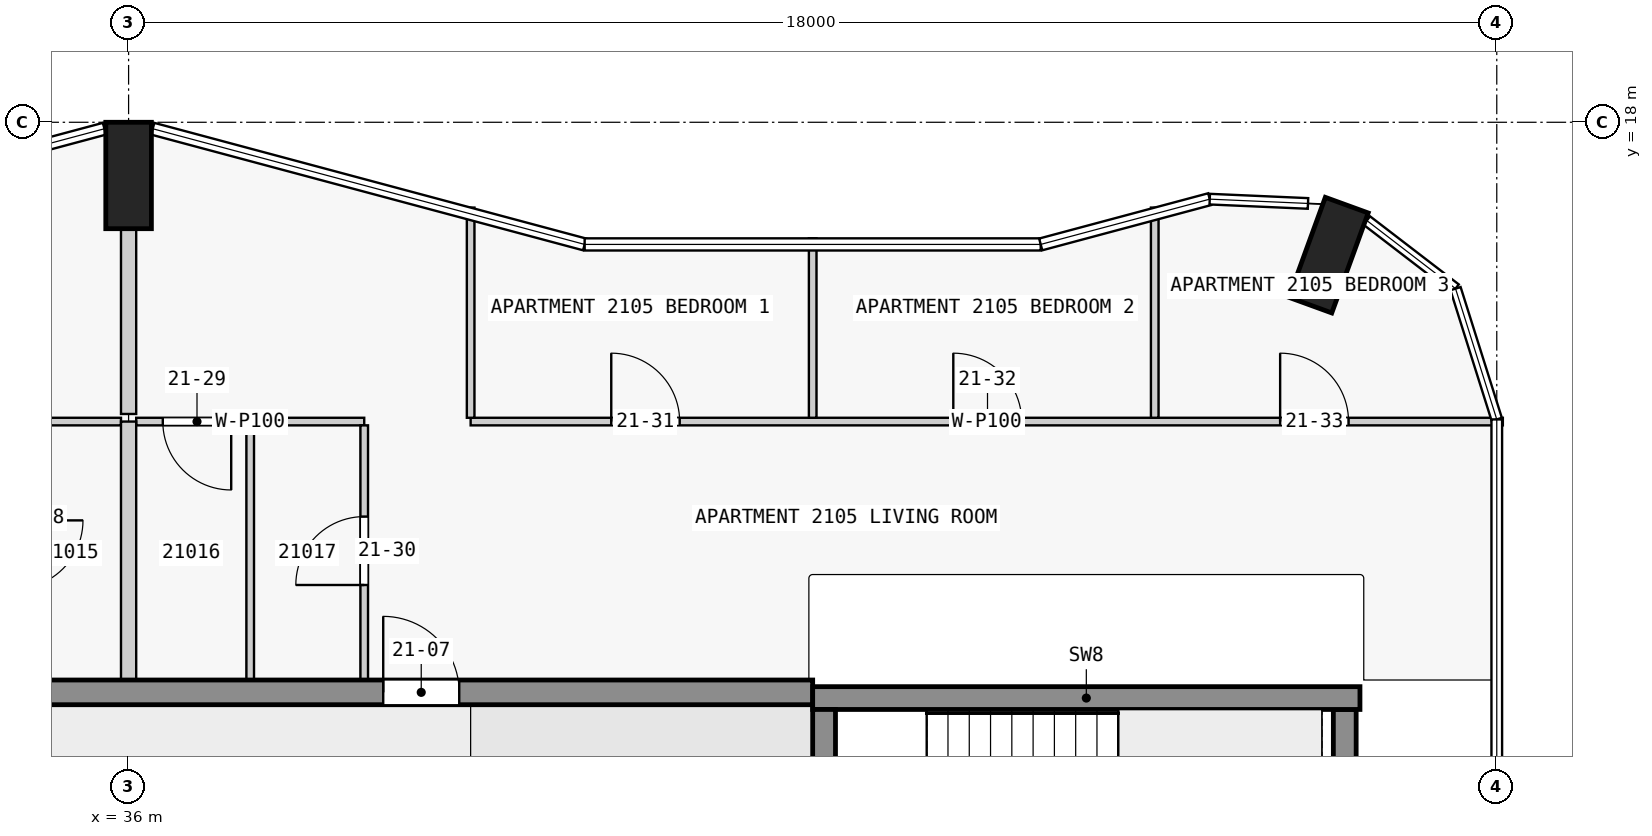
"""IFC4 building model, lengths in metres.
Left out: names, types, materials, properties, quantities, classifications, styles, units other than length and angle.
Written with IfcOpenShell. Run it as: python <this file> out.ifc"""

import sys

from ifc_helpers import new_model, si_unit, direction, frame, frame_2d, origin, origin_2d, place, context, subcontext, project, spatial, rectangle, extrude, element, fill, save


model = new_model("IFC4")
c1 = context("Model", 3, precision=1e-05, world=origin(), true_north=direction((0.0, 1.0)))
c2 = subcontext(c1, "Body", "Model", "MODEL_VIEW")
j1 = project(units=[si_unit("LENGTHUNIT", "METRE"), si_unit("PLANEANGLEUNIT", "RADIAN")], contexts=[c1])
p1 = place(None, origin())
s1 = spatial("IfcSite", under=j1, at=p1, CompositionType="ELEMENT")
p2 = place(p1, origin())
s2 = spatial("IfcBuilding", under=s1, at=p2, CompositionType="ELEMENT")
p3 = place(p2, frame((0.0, 0.0, 85.3)))
s3 = spatial("IfcBuildingStorey", under=s2, at=p3, CompositionType="ELEMENT", Elevation=85.3)
for number, where, z_axis, x_axis in (
    (1, (51.787, 16.252, 0.0), (0.0, 0.0, 1.0), (-0.94, 0.342, 0.0)),
    (2, (36.0, 17.3, 0.0), (0.0, 0.0, 1.0), (1.0, 0.0, 0.0)),
):
    element("IfcColumn", number, at=place(p3, frame(where, z_axis=z_axis, x_axis=x_axis)), inside=s3, PredefinedType="COLUMN", context=c2, shape_type="SweptSolid", body=[
        extrude(rectangle(XDim=0.6, YDim=1.4, at=origin_2d()), origin(), (0.0, 0.0, 1.0), 3.5),
    ])
p4 = place(p3, frame((45.15, 7.725, 0.0), z_axis=(0.0, 0.0, 1.0), x_axis=(0.0, 1.0, 0.0)))
e3 = element("IfcWall", 3, at=p4, inside=s3, PredefinedType="SHEAR", context=c2, shape_type="SweptSolid", body=[
    extrude(rectangle(XDim=2.55, YDim=0.3, at=frame_2d((1.275, 0.0))), origin(), (0.0, 0.0, 1.0), 3.5),
])
p5 = place(p4, frame((0.725, 0.0, 0.0)))
e4 = element("IfcOpeningElement", 4, at=p5, cuts=e3, PredefinedType="OPENING", context=c2, shape_type="SweptSolid", body=[
    extrude(rectangle(XDim=1.1, YDim=2.1, at=frame_2d((0.55, 1.05))), frame((0.0, 0.16, 0.0), z_axis=(0.0, -1.0, 0.0), x_axis=(1.0, 0.0, 0.0)), (0.0, 0.0, 1.0), 0.32),
])
p6 = place(p3, frame((52.0, 7.725, 0.0), z_axis=(0.0, 0.0, 1.0), x_axis=(0.0, 1.0, 0.0)))
e5 = element("IfcWall", 5, at=p6, inside=s3, PredefinedType="SHEAR", context=c2, shape_type="SweptSolid", body=[
    extrude(rectangle(XDim=2.55, YDim=0.3, at=frame_2d((1.275, 0.0))), origin(), (0.0, 0.0, 1.0), 3.5),
])
p7 = place(p3, frame((45.0, 10.425, 0.0), z_axis=(0.0, 0.0, 1.0), x_axis=(1.0, 0.0, 0.0)))
e6 = element("IfcWall", 6, at=p7, inside=s3, PredefinedType="SHEAR", context=c2, shape_type="SweptSolid", body=[
    extrude(rectangle(XDim=7.2, YDim=0.3, at=frame_2d((3.6, 0.0))), origin(), (0.0, 0.0, 1.0), 3.5),
])
p8 = place(p3, frame((22.5, 10.5, 0.0), z_axis=(0.0, 0.0, 1.0), x_axis=(1.0, 0.0, 0.0)))
e7 = element("IfcWall", 7, at=p8, inside=s3, PredefinedType="SHEAR", context=c2, shape_type="SweptSolid", body=[
    extrude(rectangle(XDim=22.5, YDim=0.325, at=frame_2d((11.25, 0.0))), origin(), (0.0, 0.0, 1.0), 3.25),
])
p9 = place(p8, frame((4.05, 0.0, 0.0)))
e8 = element("IfcOpeningElement", 8, at=p9, cuts=e7, PredefinedType="OPENING", context=c2, shape_type="SweptSolid", body=[
    extrude(rectangle(XDim=1.0, YDim=2.1, at=frame_2d((0.5, 1.05))), frame((0.0, 0.172, 0.0), z_axis=(0.0, -1.0, 0.0), x_axis=(1.0, 0.0, 0.0)), (0.0, 0.0, 1.0), 0.345),
])
p10 = place(p8, frame((10.75, 0.0, 0.0)))
e9 = element("IfcOpeningElement", 9, at=p10, cuts=e7, PredefinedType="OPENING", context=c2, shape_type="SweptSolid", body=[
    extrude(rectangle(XDim=1.0, YDim=2.1, at=frame_2d((0.5, 1.05))), frame((0.0, 0.172, 0.0), z_axis=(0.0, -1.0, 0.0), x_axis=(1.0, 0.0, 0.0)), (0.0, 0.0, 1.0), 0.345),
])
p11 = place(p8, frame((16.85, 0.0, 0.0)))
e10 = element("IfcOpeningElement", 10, at=p11, cuts=e7, PredefinedType="OPENING", context=c2, shape_type="SweptSolid", body=[
    extrude(rectangle(XDim=1.0, YDim=2.1, at=frame_2d((0.5, 1.05))), frame((0.0, 0.172, 0.0), z_axis=(0.0, -1.0, 0.0), x_axis=(1.0, 0.0, 0.0)), (0.0, 0.0, 1.0), 0.345),
])
p12 = place(p3, frame((35.9, 14.062, 0.0), z_axis=(0.0, 0.0, 1.0), x_axis=(-1.0, 0.0, 0.0)))
e11 = element("IfcWall", 11, at=p12, inside=s3, PredefinedType="PARTITIONING", context=c2, shape_type="SweptSolid", body=[
    extrude(rectangle(XDim=1.4, YDim=0.1, at=frame_2d((0.7, 0.0))), origin(), (0.0, 0.0, 1.0), 3.25),
])
p13 = place(p3, frame((39.1, 14.062, 0.0), z_axis=(0.0, 0.0, 1.0), x_axis=(-1.0, 0.0, 0.0)))
e12 = element("IfcWall", 12, at=p13, inside=s3, PredefinedType="PARTITIONING", context=c2, shape_type="SweptSolid", body=[
    extrude(rectangle(XDim=3.0, YDim=0.1, at=frame_2d((1.5, 0.0))), origin(), (0.0, 0.0, 1.0), 3.25),
])
p14 = place(p13, frame((1.75, 0.0, 0.0)))
e13 = element("IfcOpeningElement", 13, at=p14, cuts=e12, PredefinedType="OPENING", context=c2, shape_type="SweptSolid", body=[
    extrude(rectangle(XDim=0.9, YDim=2.1, at=frame_2d((0.45, 1.05))), frame((0.0, 0.06, 0.0), z_axis=(0.0, -1.0, 0.0), x_axis=(1.0, 0.0, 0.0)), (0.0, 0.0, 1.0), 0.12),
])
p15 = place(p3, frame((40.5, 14.062, 0.0), z_axis=(0.0, 0.0, 1.0), x_axis=(1.0, 0.0, 0.0)))
e14 = element("IfcWall", 14, at=p15, inside=s3, PredefinedType="PARTITIONING", context=c2, shape_type="SweptSolid", body=[
    extrude(rectangle(XDim=13.58, YDim=0.1, at=frame_2d((6.79, 0.0))), origin(), (0.0, 0.0, 1.0), 3.25),
])
p16 = place(p15, frame((1.85, 0.0, 0.0)))
e15 = element("IfcOpeningElement", 15, at=p16, cuts=e14, PredefinedType="OPENING", context=c2, shape_type="SweptSolid", body=[
    extrude(rectangle(XDim=0.9, YDim=2.1, at=frame_2d((0.45, 1.05))), frame((0.0, 0.06, 0.0), z_axis=(0.0, -1.0, 0.0), x_axis=(1.0, 0.0, 0.0)), (0.0, 0.0, 1.0), 0.12),
])
p17 = place(p15, frame((6.35, 0.0, 0.0)))
e16 = element("IfcOpeningElement", 16, at=p17, cuts=e14, PredefinedType="OPENING", context=c2, shape_type="SweptSolid", body=[
    extrude(rectangle(XDim=0.9, YDim=2.1, at=frame_2d((0.45, 1.05))), frame((0.0, 0.06, 0.0), z_axis=(0.0, -1.0, 0.0), x_axis=(1.0, 0.0, 0.0)), (0.0, 0.0, 1.0), 0.12),
])
p18 = place(p15, frame((10.65, 0.0, 0.0)))
e17 = element("IfcOpeningElement", 17, at=p18, cuts=e14, PredefinedType="OPENING", context=c2, shape_type="SweptSolid", body=[
    extrude(rectangle(XDim=0.9, YDim=2.1, at=frame_2d((0.45, 1.05))), frame((0.0, 0.06, 0.0), z_axis=(0.0, -1.0, 0.0), x_axis=(1.0, 0.0, 0.0)), (0.0, 0.0, 1.0), 0.12),
])
p19 = place(p3, frame((36.0, 16.6, 0.0), z_axis=(0.0, 0.0, 1.0), x_axis=(0.0, -1.0, 0.0)))
e18 = element("IfcWall", 18, at=p19, inside=s3, PredefinedType="PARTITIONING", context=c2, shape_type="SweptSolid", body=[
    extrude(rectangle(XDim=2.438, YDim=0.2, at=frame_2d((1.219, 0.0))), origin(), (0.0, 0.0, 1.0), 3.25),
])
p20 = place(p3, frame((36.0, 10.663, 0.0), z_axis=(0.0, 0.0, 1.0), x_axis=(0.0, 1.0, 0.0)))
e19 = element("IfcWall", 19, at=p20, inside=s3, PredefinedType="PARTITIONING", context=c2, shape_type="SweptSolid", body=[
    extrude(rectangle(XDim=3.4, YDim=0.2, at=frame_2d((1.7, 0.0))), origin(), (0.0, 0.0, 1.0), 3.25),
])
p21 = place(p3, frame((37.6, 10.663, 0.0), z_axis=(0.0, 0.0, 1.0), x_axis=(0.0, 1.0, 0.0)))
e20 = element("IfcWall", 20, at=p21, inside=s3, PredefinedType="PARTITIONING", context=c2, shape_type="SweptSolid", body=[
    extrude(rectangle(XDim=3.35, YDim=0.1, at=frame_2d((1.675, 0.0))), origin(), (0.0, 0.0, 1.0), 3.25),
])
p22 = place(p3, frame((39.1, 10.663, 0.0), z_axis=(0.0, 0.0, 1.0), x_axis=(0.0, 1.0, 0.0)))
e21 = element("IfcWall", 21, at=p22, inside=s3, PredefinedType="PARTITIONING", context=c2, shape_type="SweptSolid", body=[
    extrude(rectangle(XDim=3.35, YDim=0.1, at=frame_2d((1.675, 0.0))), origin(), (0.0, 0.0, 1.0), 3.25),
])
p23 = place(p22, frame((1.25, 0.0, 0.0)))
e22 = element("IfcOpeningElement", 22, at=p23, cuts=e21, PredefinedType="OPENING", context=c2, shape_type="SweptSolid", body=[
    extrude(rectangle(XDim=0.9, YDim=2.1, at=frame_2d((0.45, 1.05))), frame((0.0, 0.06, 0.0), z_axis=(0.0, -1.0, 0.0), x_axis=(1.0, 0.0, 0.0)), (0.0, 0.0, 1.0), 0.12),
])
p24 = place(p3, frame((40.5, 16.878, 0.0), z_axis=(0.0, 0.0, 1.0), x_axis=(0.0, -1.0, 0.0)))
e23 = element("IfcWall", 23, at=p24, inside=s3, PredefinedType="PARTITIONING", context=c2, shape_type="SweptSolid", body=[
    extrude(rectangle(XDim=2.765, YDim=0.1, at=frame_2d((1.383, 0.0))), origin(), (0.0, 0.0, 1.0), 3.25),
])
p25 = place(p3, frame((45.0, 14.113, 0.0), z_axis=(0.0, 0.0, 1.0), x_axis=(0.0, 1.0, 0.0)))
e24 = element("IfcWall", 24, at=p25, inside=s3, PredefinedType="PARTITIONING", context=c2, shape_type="SweptSolid", body=[
    extrude(rectangle(XDim=2.361, YDim=0.1, at=frame_2d((1.18, 0.0))), origin(), (0.0, 0.0, 1.0), 3.25),
])
p26 = place(p3, frame((49.5, 14.113, 0.0), z_axis=(0.0, 0.0, 1.0), x_axis=(0.0, 1.0, 0.0)))
e25 = element("IfcWall", 25, at=p26, inside=s3, PredefinedType="PARTITIONING", context=c2, shape_type="SweptSolid", body=[
    extrude(rectangle(XDim=2.765, YDim=0.1, at=frame_2d((1.383, 0.0))), origin(), (0.0, 0.0, 1.0), 3.25),
])
p27 = place(p11, origin())
e26 = element("IfcDoor", 26, at=p27, inside=s3, OperationType="SINGLE_SWING_RIGHT", PredefinedType="DOOR", context=c2, shape_type="SweptSolid", body=[
    extrude(rectangle(XDim=1.0, YDim=2.1, at=frame_2d((0.5, 1.05))), frame((0.0, 0.025, 0.0), z_axis=(0.0, -1.0, 0.0), x_axis=(1.0, 0.0, 0.0)), (0.0, 0.0, 1.0), 0.05),
])
fill(e10, e26)
p28 = place(p14, origin())
e27 = element("IfcDoor", 27, at=p28, inside=s3, OperationType="SINGLE_SWING_RIGHT", PredefinedType="DOOR", context=c2, shape_type="SweptSolid", body=[
    extrude(rectangle(XDim=0.9, YDim=2.1, at=frame_2d((0.45, 1.05))), frame((0.0, 0.025, 0.0), z_axis=(0.0, -1.0, 0.0), x_axis=(1.0, 0.0, 0.0)), (0.0, 0.0, 1.0), 0.05),
])
fill(e13, e27)
p29 = place(p23, origin())
e28 = element("IfcDoor", 28, at=p29, inside=s3, OperationType="SINGLE_SWING_RIGHT", PredefinedType="DOOR", context=c2, shape_type="SweptSolid", body=[
    extrude(rectangle(XDim=0.9, YDim=2.1, at=frame_2d((0.45, 1.05))), frame((0.0, 0.025, 0.0), z_axis=(0.0, -1.0, 0.0), x_axis=(1.0, 0.0, 0.0)), (0.0, 0.0, 1.0), 0.05),
])
fill(e22, e28)
p30 = place(p16, origin())
e29 = element("IfcDoor", 29, at=p30, inside=s3, OperationType="SINGLE_SWING_LEFT", PredefinedType="DOOR", context=c2, shape_type="SweptSolid", body=[
    extrude(rectangle(XDim=0.9, YDim=2.1, at=frame_2d((0.45, 1.05))), frame((0.0, 0.025, 0.0), z_axis=(0.0, -1.0, 0.0), x_axis=(1.0, 0.0, 0.0)), (0.0, 0.0, 1.0), 0.05),
])
fill(e15, e29)
p31 = place(p17, origin())
e30 = element("IfcDoor", 30, at=p31, inside=s3, OperationType="SINGLE_SWING_RIGHT", PredefinedType="DOOR", context=c2, shape_type="SweptSolid", body=[
    extrude(rectangle(XDim=0.9, YDim=2.1, at=frame_2d((0.45, 1.05))), frame((0.0, 0.025, 0.0), z_axis=(0.0, -1.0, 0.0), x_axis=(1.0, 0.0, 0.0)), (0.0, 0.0, 1.0), 0.05),
])
fill(e16, e30)
p32 = place(p18, origin())
e31 = element("IfcDoor", 31, at=p32, inside=s3, OperationType="SINGLE_SWING_RIGHT", PredefinedType="DOOR", context=c2, shape_type="SweptSolid", body=[
    extrude(rectangle(XDim=0.9, YDim=2.1, at=frame_2d((0.45, 1.05))), frame((0.0, 0.025, 0.0), z_axis=(0.0, -1.0, 0.0), x_axis=(1.0, 0.0, 0.0)), (0.0, 0.0, 1.0), 0.05),
])
fill(e17, e31)
save(model, sys.argv[1])
